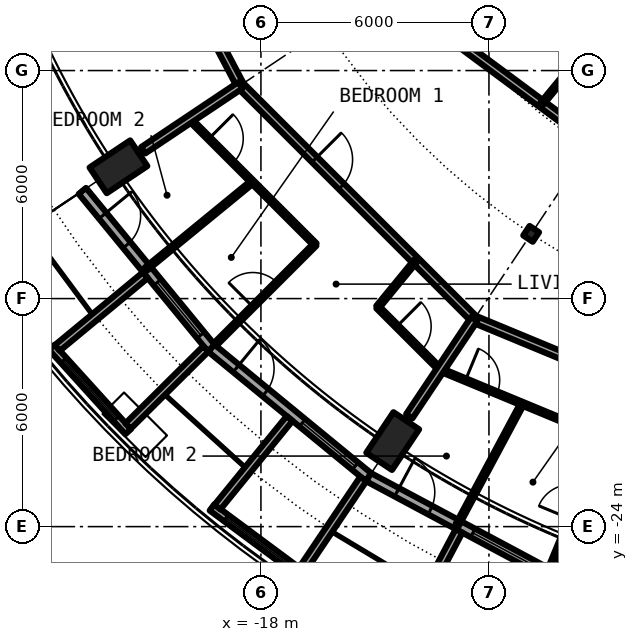
"""IFC4 building model, lengths in metres.
Left out: names, types, materials, properties, quantities, classifications, styles, units other than length and angle.
Written with IfcOpenShell. Run it as: python <this file> out.ifc"""

import sys

from ifc_helpers import new_model, si_unit, direction, frame, frame_2d, origin, origin_2d, place, context, subcontext, project, spatial, rectangle, circle, hollow_circle, i_section, extrude, element, fill, save


model = new_model("IFC4")
c1 = context("Model", 3, precision=1e-05, world=origin(), true_north=direction((0.0, 1.0)))
c2 = subcontext(c1, "Body", "Model", "MODEL_VIEW")
j1 = project(units=[si_unit("LENGTHUNIT", "METRE"), si_unit("PLANEANGLEUNIT", "RADIAN")], contexts=[c1])
p1 = place(None, origin())
s1 = spatial("IfcSite", under=j1, at=p1, CompositionType="ELEMENT")
p2 = place(p1, origin())
s2 = spatial("IfcBuilding", under=s1, at=p2, CompositionType="ELEMENT")
p3 = place(p2, frame((0.0, 0.0, 234.05)))
s3 = spatial("IfcBuildingStorey", under=s2, at=p3, CompositionType="ELEMENT", Elevation=234.05)
for number, where, z_axis, x_axis in (
    (1, (-22.283, -14.889, 0.0), (0.347, 0.232, 0.909), (-0.556, 0.831, 0.0)),
    (2, (-14.889, -22.283, 0.0), (0.232, 0.347, 0.909), (-0.831, 0.556, 0.0)),
):
    element("IfcColumn", number, at=place(p3, frame(where, z_axis=z_axis, x_axis=x_axis)), inside=s3, PredefinedType="COLUMN", context=c2, shape_type="SweptSolid", body=[
        extrude(hollow_circle(Radius=0.406, WallThickness=0.03, at=origin_2d()), origin(), (0.0, 0.0, 1.0), 3.081),
    ])
p4 = place(p3, frame((-10.889, -16.297, 0.0), z_axis=(0.0, 0.0, 1.0), x_axis=(-0.55557023302, -0.831469612303, 0.0)))
e3 = element("IfcColumn", 3, at=p4, inside=s3, PredefinedType="COLUMN", context=c2, shape_type="SweptSolid", body=[
    extrude(i_section(OverallWidth=0.3, OverallDepth=0.3, WebThickness=0.011, FlangeThickness=0.019, FilletRadius=0.027, at=origin_2d()), origin(), (0.0, 0.0, 1.0), 3.05),
])
p5 = place(p3, frame((-22.699, -15.167, 0.0), z_axis=(0.0, 0.0, 1.0), x_axis=(0.634382322723, -0.773019449054, 0.0)))
e4 = element("IfcWall", 4, at=p5, inside=s3, PredefinedType="SOLIDWALL", context=c2, shape_type="SweptSolid", body=[
    extrude(rectangle(XDim=5.352, YDim=0.25, at=frame_2d((2.676, 0.0))), origin(), (0.0, 0.0, 1.0), 2.7),
])
p6 = place(p5, frame((0.841, 0.0, 0.0)))
e5 = element("IfcOpeningElement", 5, at=p6, cuts=e4, PredefinedType="OPENING", context=c2, shape_type="SweptSolid", body=[
    extrude(rectangle(XDim=1.0, YDim=2.2, at=frame_2d((0.5, 1.1))), frame((0.0, 0.135, 0.0), z_axis=(0.0, -1.0, 0.0), x_axis=(1.0, 0.0, 0.0)), (0.0, 0.0, 1.0), 0.27),
])
p7 = place(p5, frame((3.111, 0.0, 0.3)))
e6 = element("IfcOpeningElement", 6, at=p7, cuts=e4, PredefinedType="OPENING", context=c2, shape_type="SweptSolid", body=[
    extrude(rectangle(XDim=1.8, YDim=2.1, at=frame_2d((0.9, 1.05))), frame((0.0, 0.135, 0.0), z_axis=(0.0, -1.0, 0.0), x_axis=(1.0, 0.0, 0.0)), (0.0, 0.0, 1.0), 0.27),
])
p8 = place(p3, frame((-23.503, -19.282, -0.03), z_axis=(0.0, 0.0, 1.0), x_axis=(0.671506829416, -0.740998365753, 0.0)))
e7 = element("IfcWall", 7, at=p8, inside=s3, PredefinedType="SOLIDWALL", context=c2, shape_type="SweptSolid", body=[
    extrude(rectangle(XDim=2.993, YDim=0.2, at=frame_2d((1.497, 0.0))), origin(), (0.0, 0.0, 1.0), 2.73),
])
p9 = place(p8, frame((0.457, 0.0, 0.33)))
e8 = element("IfcOpeningElement", 8, at=p9, cuts=e7, PredefinedType="OPENING", context=c2, shape_type="SweptSolid", body=[
    extrude(circle(Radius=1.04, at=frame_2d((1.04, 1.04))), frame((0.0, 0.11, 0.0), z_axis=(0.0, -1.0, 0.0), x_axis=(1.0, 0.0, 0.0)), (0.0, 0.0, 1.0), 0.22),
])
p10 = place(p3, frame((-21.041, -17.384, -0.03), z_axis=(0.0, 0.0, 1.0), x_axis=(-0.770784861449, -0.63709551667, 0.0)))
e9 = element("IfcWall", 9, at=p10, inside=s3, PredefinedType="SOLIDWALL", context=c2, shape_type="SweptSolid", body=[
    extrude(rectangle(XDim=3.006, YDim=0.2, at=frame_2d((1.503, 0.0))), origin(), (0.0, 0.0, 1.0), 2.73),
])
p11 = place(p3, frame((-19.45, -19.323, -0.03), z_axis=(0.0, 0.0, 1.0), x_axis=(-0.709727076896, -0.704476739375, 0.0)))
e10 = element("IfcWall", 10, at=p11, inside=s3, PredefinedType="SOLIDWALL", context=c2, shape_type="SweptSolid", body=[
    extrude(rectangle(XDim=2.883, YDim=0.2, at=frame_2d((1.441, 0.0))), origin(), (0.0, 0.0, 1.0), 2.73),
])
p12 = place(p3, frame((-19.304, -19.304, 0.0), z_axis=(0.0, 0.0, 1.0), x_axis=(0.773019449054, -0.634382322723, 0.0)))
e11 = element("IfcWall", 11, at=p12, inside=s3, PredefinedType="SOLIDWALL", context=c2, shape_type="SweptSolid", body=[
    extrude(rectangle(XDim=5.352, YDim=0.25, at=frame_2d((2.676, 0.0))), origin(), (0.0, 0.0, 1.0), 2.7),
])
p13 = place(p12, frame((0.841, 0.0, 0.0)))
e12 = element("IfcOpeningElement", 12, at=p13, cuts=e11, PredefinedType="OPENING", context=c2, shape_type="SweptSolid", body=[
    extrude(rectangle(XDim=1.0, YDim=2.2, at=frame_2d((0.5, 1.1))), frame((0.0, 0.135, 0.0), z_axis=(0.0, -1.0, 0.0), x_axis=(1.0, 0.0, 0.0)), (0.0, 0.0, 1.0), 0.27),
])
p14 = place(p12, frame((3.096, 0.0, 0.3)))
e13 = element("IfcOpeningElement", 13, at=p14, cuts=e11, PredefinedType="OPENING", context=c2, shape_type="SweptSolid", body=[
    extrude(rectangle(XDim=1.8, YDim=2.1, at=frame_2d((0.9, 1.05))), frame((0.0, 0.135, 0.0), z_axis=(0.0, -1.0, 0.0), x_axis=(1.0, 0.0, 0.0)), (0.0, 0.0, 1.0), 0.27),
])
p15 = place(p3, frame((-19.289, -23.496, -0.03), z_axis=(0.0, 0.0, 1.0), x_axis=(0.803052706508, -0.595908005124, 0.0)))
e14 = element("IfcWall", 14, at=p15, inside=s3, PredefinedType="SOLIDWALL", context=c2, shape_type="SweptSolid", body=[
    extrude(rectangle(XDim=2.994, YDim=0.2, at=frame_2d((1.497, 0.0))), origin(), (0.0, 0.0, 1.0), 2.73),
])
p16 = place(p15, frame((0.457, 0.0, 0.33)))
e15 = element("IfcOpeningElement", 15, at=p16, cuts=e14, PredefinedType="OPENING", context=c2, shape_type="SweptSolid", body=[
    extrude(circle(Radius=1.04, at=frame_2d((1.04, 1.04))), frame((0.0, 0.11, 0.0), z_axis=(0.0, -1.0, 0.0), x_axis=(1.0, 0.0, 0.0)), (0.0, 0.0, 1.0), 0.22),
])
p17 = place(p3, frame((-17.246, -21.155, -0.03), z_axis=(0.0, 0.0, 1.0), x_axis=(-0.631546363729, -0.775338113639, 0.0)))
e16 = element("IfcWall", 16, at=p17, inside=s3, PredefinedType="SOLIDWALL", context=c2, shape_type="SweptSolid", body=[
    extrude(rectangle(XDim=3.005, YDim=0.2, at=frame_2d((1.502, 0.0))), origin(), (0.0, 0.0, 1.0), 2.73),
])
p18 = place(p3, frame((-15.307, -22.746, -0.03), z_axis=(0.0, 0.0, 1.0), x_axis=(-0.558583730979, -0.829448139117, 0.0)))
e17 = element("IfcWall", 17, at=p18, inside=s3, PredefinedType="SOLIDWALL", context=c2, shape_type="SweptSolid", body=[
    extrude(rectangle(XDim=2.883, YDim=0.2, at=frame_2d((1.441, 0.0))), origin(), (0.0, 0.0, 1.0), 2.73),
])
p19 = place(p3, frame((-15.167, -22.699, 0.0), z_axis=(0.0, 0.0, 1.0), x_axis=(0.881915646801, -0.471407246368, 0.0)))
e18 = element("IfcWall", 18, at=p19, inside=s3, PredefinedType="SOLIDWALL", context=c2, shape_type="SweptSolid", body=[
    extrude(rectangle(XDim=5.352, YDim=0.25, at=frame_2d((2.676, 0.0))), origin(), (0.0, 0.0, 1.0), 2.7),
])
p20 = place(p19, frame((0.841, 0.0, 0.0)))
e19 = element("IfcOpeningElement", 19, at=p20, cuts=e18, PredefinedType="OPENING", context=c2, shape_type="SweptSolid", body=[
    extrude(rectangle(XDim=1.0, YDim=2.2, at=frame_2d((0.5, 1.1))), frame((0.0, 0.135, 0.0), z_axis=(0.0, -1.0, 0.0), x_axis=(1.0, 0.0, 0.0)), (0.0, 0.0, 1.0), 0.27),
])
p21 = place(p19, frame((3.111, 0.0, 0.3)))
e20 = element("IfcOpeningElement", 20, at=p21, cuts=e18, PredefinedType="OPENING", context=c2, shape_type="SweptSolid", body=[
    extrude(rectangle(XDim=1.8, YDim=2.1, at=frame_2d((0.9, 1.05))), frame((0.0, 0.135, 0.0), z_axis=(0.0, -1.0, 0.0), x_axis=(1.0, 0.0, 0.0)), (0.0, 0.0, 1.0), 0.27),
])
p22 = place(p3, frame((-12.787, -24.113, -0.03), z_axis=(0.0, 0.0, 1.0), x_axis=(-0.468365282436, -0.883534924159, 0.0)))
e21 = element("IfcWall", 21, at=p22, inside=s3, PredefinedType="SOLIDWALL", context=c2, shape_type="SweptSolid", body=[
    extrude(rectangle(XDim=3.006, YDim=0.2, at=frame_2d((1.503, 0.0))), origin(), (0.0, 0.0, 1.0), 2.73),
])
p23 = place(p3, frame((-19.869, -13.285, 0.0), z_axis=(0.0, 0.0, 1.0), x_axis=(0.707290020325, -0.706923494552, 0.0)))
e22 = element("IfcWall", 22, at=p23, inside=s3, PredefinedType="PARTITIONING", context=c2, shape_type="SweptSolid", body=[
    extrude(rectangle(XDim=4.663, YDim=0.1, at=frame_2d((2.331, 0.0))), origin(), (0.0, 0.0, 1.0), 2.7),
])
p24 = place(p23, frame((0.712, 0.0, 0.0)))
e23 = element("IfcOpeningElement", 23, at=p24, cuts=e22, PredefinedType="OPENING", context=c2, shape_type="SweptSolid", body=[
    extrude(rectangle(XDim=0.9, YDim=2.3, at=frame_2d((0.45, 1.15))), frame((0.0, 0.06, 0.0), z_axis=(0.0, -1.0, 0.0), x_axis=(1.0, 0.0, 0.0)), (0.0, 0.0, 1.0), 0.12),
])
p25 = place(p3, frame((-14.927, -18.224, 0.0), z_axis=(0.0, 0.0, 1.0), x_axis=(0.707316201218, -0.706897299114, 0.0)))
e24 = element("IfcWall", 24, at=p25, inside=s3, PredefinedType="PARTITIONING", context=c2, shape_type="SweptSolid", body=[
    extrude(rectangle(XDim=2.331, YDim=0.1, at=frame_2d((1.166, 0.0))), origin(), (0.0, 0.0, 1.0), 2.7),
])
p26 = place(p25, frame((0.716, 0.0, 0.0)))
e25 = element("IfcOpeningElement", 25, at=p26, cuts=e24, PredefinedType="OPENING", context=c2, shape_type="SweptSolid", body=[
    extrude(rectangle(XDim=0.9, YDim=2.3, at=frame_2d((0.45, 1.15))), frame((0.0, 0.06, 0.0), z_axis=(0.0, -1.0, 0.0), x_axis=(1.0, 0.0, 0.0)), (0.0, 0.0, 1.0), 0.12),
])
p27 = place(p3, frame((-13.278, -19.873, 0.0), z_axis=(0.0, 0.0, 1.0), x_axis=(0.923920484476, -0.38258455061, 0.0)))
e26 = element("IfcWall", 26, at=p27, inside=s3, PredefinedType="PARTITIONING", context=c2, shape_type="SweptSolid", body=[
    extrude(rectangle(XDim=4.663, YDim=0.1, at=frame_2d((2.332, 0.0))), origin(), (0.0, 0.0, 1.0), 2.7),
])
p28 = place(p27, frame((0.715, 0.0, 0.0)))
e27 = element("IfcOpeningElement", 27, at=p28, cuts=e26, PredefinedType="OPENING", context=c2, shape_type="SweptSolid", body=[
    extrude(rectangle(XDim=0.9, YDim=2.3, at=frame_2d((0.45, 1.15))), frame((0.0, 0.06, 0.0), z_axis=(0.0, -1.0, 0.0), x_axis=(1.0, 0.0, 0.0)), (0.0, 0.0, 1.0), 0.12),
])
p29 = place(p3, frame((-19.328, -10.896, 0.0), z_axis=(0.0, 0.0, 1.0), x_axis=(0.465812036273, -0.88488369115, 0.0)))
e28 = element("IfcWall", 28, at=p29, inside=s3, PredefinedType="PARTITIONING", context=c2, shape_type="SweptSolid", body=[
    extrude(rectangle(XDim=1.687, YDim=0.2, at=frame_2d((0.844, 0.0))), origin(), (0.0, 0.0, 1.0), 2.7),
])
p30 = place(p3, frame((-18.542, -12.389, 0.0), z_axis=(0.0, 0.0, 1.0), x_axis=(0.707106781187, -0.707106781187, 0.0)))
e29 = element("IfcWall", 29, at=p30, inside=s3, PredefinedType="PARTITIONING", context=c2, shape_type="SweptSolid", body=[
    extrude(rectangle(XDim=8.702, YDim=0.2, at=frame_2d((4.351, 0.0))), origin(), (0.0, 0.0, 1.0), 2.7),
])
p31 = place(p30, frame((2.763, 0.0, 0.0)))
e30 = element("IfcOpeningElement", 30, at=p31, cuts=e29, PredefinedType="OPENING", context=c2, shape_type="SweptSolid", body=[
    extrude(rectangle(XDim=1.0, YDim=2.3, at=frame_2d((0.5, 1.15))), frame((0.0, 0.11, 0.0), z_axis=(0.0, -1.0, 0.0), x_axis=(1.0, 0.0, 0.0)), (0.0, 0.0, 1.0), 0.22),
])
p32 = place(p3, frame((-12.389, -18.542, 0.0), z_axis=(0.0, 0.0, 1.0), x_axis=(0.923867858178, -0.382711615483, 0.0)))
e31 = element("IfcWall", 31, at=p32, inside=s3, PredefinedType="PARTITIONING", context=c2, shape_type="SweptSolid", body=[
    extrude(rectangle(XDim=8.709, YDim=0.2, at=frame_2d((4.354, 0.0))), origin(), (0.0, 0.0, 1.0), 2.7),
])
p33 = place(p32, frame((2.763, 0.0, 0.0)))
e32 = element("IfcOpeningElement", 32, at=p33, cuts=e31, PredefinedType="OPENING", context=c2, shape_type="SweptSolid", body=[
    extrude(rectangle(XDim=1.0, YDim=2.3, at=frame_2d((0.5, 1.15))), frame((0.0, 0.11, 0.0), z_axis=(0.0, -1.0, 0.0), x_axis=(1.0, 0.0, 0.0)), (0.0, 0.0, 1.0), 0.22),
])
p34 = place(p3, frame((-13.349, -10.848, 0.0), z_axis=(0.0, 0.0, 1.0), x_axis=(0.803229232922, -0.595670042371, 0.0)))
e33 = element("IfcWall", 33, at=p34, inside=s3, PredefinedType="PARTITIONING", context=c2, shape_type="SweptSolid", body=[
    extrude(rectangle(XDim=10.224, YDim=0.2, at=frame_2d((5.112, 0.0))), origin(), (0.0, 0.0, 1.0), 2.7),
])
p35 = place(p34, frame((4.612, 0.0, 0.0)))
e34 = element("IfcOpeningElement", 34, at=p35, cuts=e33, PredefinedType="OPENING", context=c2, shape_type="SweptSolid", body=[
    extrude(rectangle(XDim=1.0, YDim=2.3, at=frame_2d((0.5, 1.15))), frame((0.0, 0.11, 0.0), z_axis=(0.0, -1.0, 0.0), x_axis=(1.0, 0.0, 0.0)), (0.0, 0.0, 1.0), 0.22),
])
p36 = place(p3, frame((-14.927, -18.224, 0.0), z_axis=(0.0, 0.0, 1.0), x_axis=(0.633861186344, 0.773446828454, 0.0)))
e35 = element("IfcWall", 35, at=p36, inside=s3, PredefinedType="PARTITIONING", context=c2, shape_type="SweptSolid", body=[
    extrude(rectangle(XDim=1.578, YDim=0.1, at=frame_2d((0.789, 0.0))), origin(), (0.0, 0.0, 1.0), 2.7),
])
p37 = place(p3, frame((-21.097, -14.097, 0.0), z_axis=(0.0, 0.0, 1.0), x_axis=(0.831340764735, 0.555763018642, 0.0)))
e36 = element("IfcWall", 36, at=p37, inside=s3, PredefinedType="PARTITIONING", context=c2, shape_type="SweptSolid", body=[
    extrude(rectangle(XDim=3.073, YDim=0.2, at=frame_2d((1.537, 0.0))), origin(), (0.0, 0.0, 1.0), 2.7),
])
p38 = place(p3, frame((-21.023, -17.22, 0.0), z_axis=(0.0, 0.0, 1.0), x_axis=(0.773548271597, 0.633737383709, 0.0)))
e37 = element("IfcWall", 37, at=p38, inside=s3, PredefinedType="PARTITIONING", context=c2, shape_type="SweptSolid", body=[
    extrude(rectangle(XDim=3.618, YDim=0.1, at=frame_2d((1.809, 0.0))), origin(), (0.0, 0.0, 1.0), 2.7),
])
p39 = place(p3, frame((-19.216, -19.216, 0.0), z_axis=(0.0, 0.0, 1.0), x_axis=(0.707106781187, 0.707106781187, 0.0)))
e38 = element("IfcWall", 38, at=p39, inside=s3, PredefinedType="PARTITIONING", context=c2, shape_type="SweptSolid", body=[
    extrude(rectangle(XDim=3.735, YDim=0.1, at=frame_2d((1.868, 0.0))), origin(), (0.0, 0.0, 1.0), 2.7),
])
p40 = place(p39, frame((1.417, 0.0, 0.0)))
e39 = element("IfcOpeningElement", 39, at=p40, cuts=e38, PredefinedType="OPENING", context=c2, shape_type="SweptSolid", body=[
    extrude(rectangle(XDim=0.9, YDim=2.3, at=frame_2d((0.45, 1.15))), frame((0.0, 0.06, 0.0), z_axis=(0.0, -1.0, 0.0), x_axis=(1.0, 0.0, 0.0)), (0.0, 0.0, 1.0), 0.12),
])
p41 = place(p3, frame((-14.097, -21.097, 0.0), z_axis=(0.0, 0.0, 1.0), x_axis=(0.555763018642, 0.831340764735, 0.0)))
e40 = element("IfcWall", 40, at=p41, inside=s3, PredefinedType="PARTITIONING", context=c2, shape_type="SweptSolid", body=[
    extrude(rectangle(XDim=3.073, YDim=0.2, at=frame_2d((1.537, 0.0))), origin(), (0.0, 0.0, 1.0), 2.7),
])
p42 = place(p3, frame((-12.833, -23.954, 0.0), z_axis=(0.0, 0.0, 1.0), x_axis=(0.472212052488, 0.881484984265, 0.0)))
e41 = element("IfcWall", 41, at=p42, inside=s3, PredefinedType="PARTITIONING", context=c2, shape_type="SweptSolid", body=[
    extrude(rectangle(XDim=3.619, YDim=0.1, at=frame_2d((1.81, 0.0))), origin(), (0.0, 0.0, 1.0), 2.7),
])
p43 = place(p3, frame((-10.612, -12.878, 0.0), z_axis=(0.0, 0.0, 1.0), x_axis=(0.636115614725, 0.771593756262, 0.0)))
e42 = element("IfcWall", 42, at=p43, inside=s3, PredefinedType="PARTITIONING", context=c2, shape_type="SweptSolid", body=[
    extrude(rectangle(XDim=8.967, YDim=0.1, at=frame_2d((4.483, 0.0))), origin(), (0.0, 0.0, 1.0), 2.7),
])
p44 = place(p43, frame((1.667, 0.0, 0.0)))
e43 = element("IfcOpeningElement", 43, at=p44, cuts=e42, PredefinedType="OPENING", context=c2, shape_type="SweptSolid", body=[
    extrude(rectangle(XDim=0.9, YDim=2.3, at=frame_2d((0.45, 1.15))), frame((0.0, 0.06, 0.0), z_axis=(0.0, -1.0, 0.0), x_axis=(1.0, 0.0, 0.0)), (0.0, 0.0, 1.0), 0.12),
])
p45 = place(p43, frame((6.151, 0.0, 0.0)))
e44 = element("IfcOpeningElement", 44, at=p45, cuts=e42, PredefinedType="OPENING", context=c2, shape_type="SweptSolid", body=[
    extrude(rectangle(XDim=0.9, YDim=2.3, at=frame_2d((0.45, 1.15))), frame((0.0, 0.06, 0.0), z_axis=(0.0, -1.0, 0.0), x_axis=(1.0, 0.0, 0.0)), (0.0, 0.0, 1.0), 0.12),
])
p46 = place(p3, frame((-10.399, -25.106, 0.0), z_axis=(0.0, 0.0, 1.0), x_axis=(0.382669377748, 0.923885353999, 0.0)))
e45 = element("IfcWall", 45, at=p46, inside=s3, PredefinedType="PARTITIONING", context=c2, shape_type="SweptSolid", body=[
    extrude(rectangle(XDim=3.734, YDim=0.1, at=frame_2d((1.867, 0.0))), origin(), (0.0, 0.0, 1.0), 2.7),
])
p47 = place(p46, frame((1.417, 0.0, 0.0)))
e46 = element("IfcOpeningElement", 46, at=p47, cuts=e45, PredefinedType="OPENING", context=c2, shape_type="SweptSolid", body=[
    extrude(rectangle(XDim=0.9, YDim=2.3, at=frame_2d((0.45, 1.15))), frame((0.0, 0.06, 0.0), z_axis=(0.0, -1.0, 0.0), x_axis=(1.0, 0.0, 0.0)), (0.0, 0.0, 1.0), 0.12),
])
p48 = place(p6, origin())
e47 = element("IfcDoor", 47, at=p48, inside=s3, OperationType="SINGLE_SWING_LEFT", PredefinedType="DOOR", context=c2, shape_type="SweptSolid", body=[
    extrude(rectangle(XDim=1.0, YDim=2.2, at=frame_2d((0.5, 1.1))), frame((0.0, 0.025, 0.0), z_axis=(0.0, -1.0, 0.0), x_axis=(1.0, 0.0, 0.0)), (0.0, 0.0, 1.0), 0.05),
])
fill(e5, e47)
p49 = place(p7, origin())
e48 = element("IfcWindow", 48, at=p49, inside=s3, PartitioningType="SINGLE_PANEL", PredefinedType="WINDOW", context=c2, shape_type="SweptSolid", body=[
    extrude(rectangle(XDim=1.8, YDim=2.1, at=frame_2d((0.9, 1.05))), frame((0.0, 0.03, 0.0), z_axis=(0.0, -1.0, 0.0), x_axis=(1.0, 0.0, 0.0)), (0.0, 0.0, 1.0), 0.06),
])
fill(e6, e48)
p50 = place(p9, origin())
e49 = element("IfcWindow", 49, at=p50, inside=s3, PartitioningType="SINGLE_PANEL", PredefinedType="WINDOW", context=c2, shape_type="SweptSolid", body=[
    extrude(circle(Radius=1.04, at=frame_2d((1.04, 1.04))), frame((0.0, 0.03, 0.0), z_axis=(0.0, -1.0, 0.0), x_axis=(1.0, 0.0, 0.0)), (0.0, 0.0, 1.0), 0.06),
])
fill(e8, e49)
p51 = place(p13, origin())
e50 = element("IfcDoor", 50, at=p51, inside=s3, OperationType="SINGLE_SWING_LEFT", PredefinedType="DOOR", context=c2, shape_type="SweptSolid", body=[
    extrude(rectangle(XDim=1.0, YDim=2.2, at=frame_2d((0.5, 1.1))), frame((0.0, 0.025, 0.0), z_axis=(0.0, -1.0, 0.0), x_axis=(1.0, 0.0, 0.0)), (0.0, 0.0, 1.0), 0.05),
])
fill(e12, e50)
p52 = place(p14, origin())
e51 = element("IfcWindow", 51, at=p52, inside=s3, PartitioningType="SINGLE_PANEL", PredefinedType="WINDOW", context=c2, shape_type="SweptSolid", body=[
    extrude(rectangle(XDim=1.8, YDim=2.1, at=frame_2d((0.9, 1.05))), frame((0.0, 0.03, 0.0), z_axis=(0.0, -1.0, 0.0), x_axis=(1.0, 0.0, 0.0)), (0.0, 0.0, 1.0), 0.06),
])
fill(e13, e51)
p53 = place(p16, origin())
e52 = element("IfcWindow", 52, at=p53, inside=s3, PartitioningType="SINGLE_PANEL", PredefinedType="WINDOW", context=c2, shape_type="SweptSolid", body=[
    extrude(circle(Radius=1.04, at=frame_2d((1.04, 1.04))), frame((0.0, 0.03, 0.0), z_axis=(0.0, -1.0, 0.0), x_axis=(1.0, 0.0, 0.0)), (0.0, 0.0, 1.0), 0.06),
])
fill(e15, e52)
p54 = place(p20, origin())
e53 = element("IfcDoor", 53, at=p54, inside=s3, OperationType="SINGLE_SWING_LEFT", PredefinedType="DOOR", context=c2, shape_type="SweptSolid", body=[
    extrude(rectangle(XDim=1.0, YDim=2.2, at=frame_2d((0.5, 1.1))), frame((0.0, 0.025, 0.0), z_axis=(0.0, -1.0, 0.0), x_axis=(1.0, 0.0, 0.0)), (0.0, 0.0, 1.0), 0.05),
])
fill(e19, e53)
p55 = place(p21, origin())
e54 = element("IfcWindow", 54, at=p55, inside=s3, PartitioningType="SINGLE_PANEL", PredefinedType="WINDOW", context=c2, shape_type="SweptSolid", body=[
    extrude(rectangle(XDim=1.8, YDim=2.1, at=frame_2d((0.9, 1.05))), frame((0.0, 0.03, 0.0), z_axis=(0.0, -1.0, 0.0), x_axis=(1.0, 0.0, 0.0)), (0.0, 0.0, 1.0), 0.06),
])
fill(e20, e54)
p56 = place(p31, origin())
e55 = element("IfcDoor", 55, at=p56, inside=s3, OperationType="SINGLE_SWING_LEFT", PredefinedType="DOOR", context=c2, shape_type="SweptSolid", body=[
    extrude(rectangle(XDim=1.0, YDim=2.3, at=frame_2d((0.5, 1.15))), frame((0.0, 0.025, 0.0), z_axis=(0.0, -1.0, 0.0), x_axis=(1.0, 0.0, 0.0)), (0.0, 0.0, 1.0), 0.05),
])
fill(e30, e55)
p57 = place(p26, origin())
e56 = element("IfcDoor", 56, at=p57, inside=s3, OperationType="SINGLE_SWING_LEFT", PredefinedType="DOOR", context=c2, shape_type="SweptSolid", body=[
    extrude(rectangle(XDim=0.9, YDim=2.3, at=frame_2d((0.45, 1.15))), frame((0.0, 0.025, 0.0), z_axis=(0.0, -1.0, 0.0), x_axis=(1.0, 0.0, 0.0)), (0.0, 0.0, 1.0), 0.05),
])
fill(e25, e56)
p58 = place(p40, origin())
e57 = element("IfcDoor", 57, at=p58, inside=s3, OperationType="SINGLE_SWING_LEFT", PredefinedType="DOOR", context=c2, shape_type="SweptSolid", body=[
    extrude(rectangle(XDim=0.9, YDim=2.3, at=frame_2d((0.45, 1.15))), frame((0.0, 0.025, 0.0), z_axis=(0.0, -1.0, 0.0), x_axis=(1.0, 0.0, 0.0)), (0.0, 0.0, 1.0), 0.05),
])
fill(e39, e57)
p59 = place(p24, origin())
e58 = element("IfcDoor", 58, at=p59, inside=s3, OperationType="SINGLE_SWING_LEFT", PredefinedType="DOOR", context=c2, shape_type="SweptSolid", body=[
    extrude(rectangle(XDim=0.9, YDim=2.3, at=frame_2d((0.45, 1.15))), frame((0.0, 0.025, 0.0), z_axis=(0.0, -1.0, 0.0), x_axis=(1.0, 0.0, 0.0)), (0.0, 0.0, 1.0), 0.05),
])
fill(e23, e58)
p60 = place(p28, origin())
e59 = element("IfcDoor", 59, at=p60, inside=s3, OperationType="SINGLE_SWING_LEFT", PredefinedType="DOOR", context=c2, shape_type="SweptSolid", body=[
    extrude(rectangle(XDim=0.9, YDim=2.3, at=frame_2d((0.45, 1.15))), frame((0.0, 0.025, 0.0), z_axis=(0.0, -1.0, 0.0), x_axis=(1.0, 0.0, 0.0)), (0.0, 0.0, 1.0), 0.05),
])
fill(e27, e59)
save(model, sys.argv[1])
